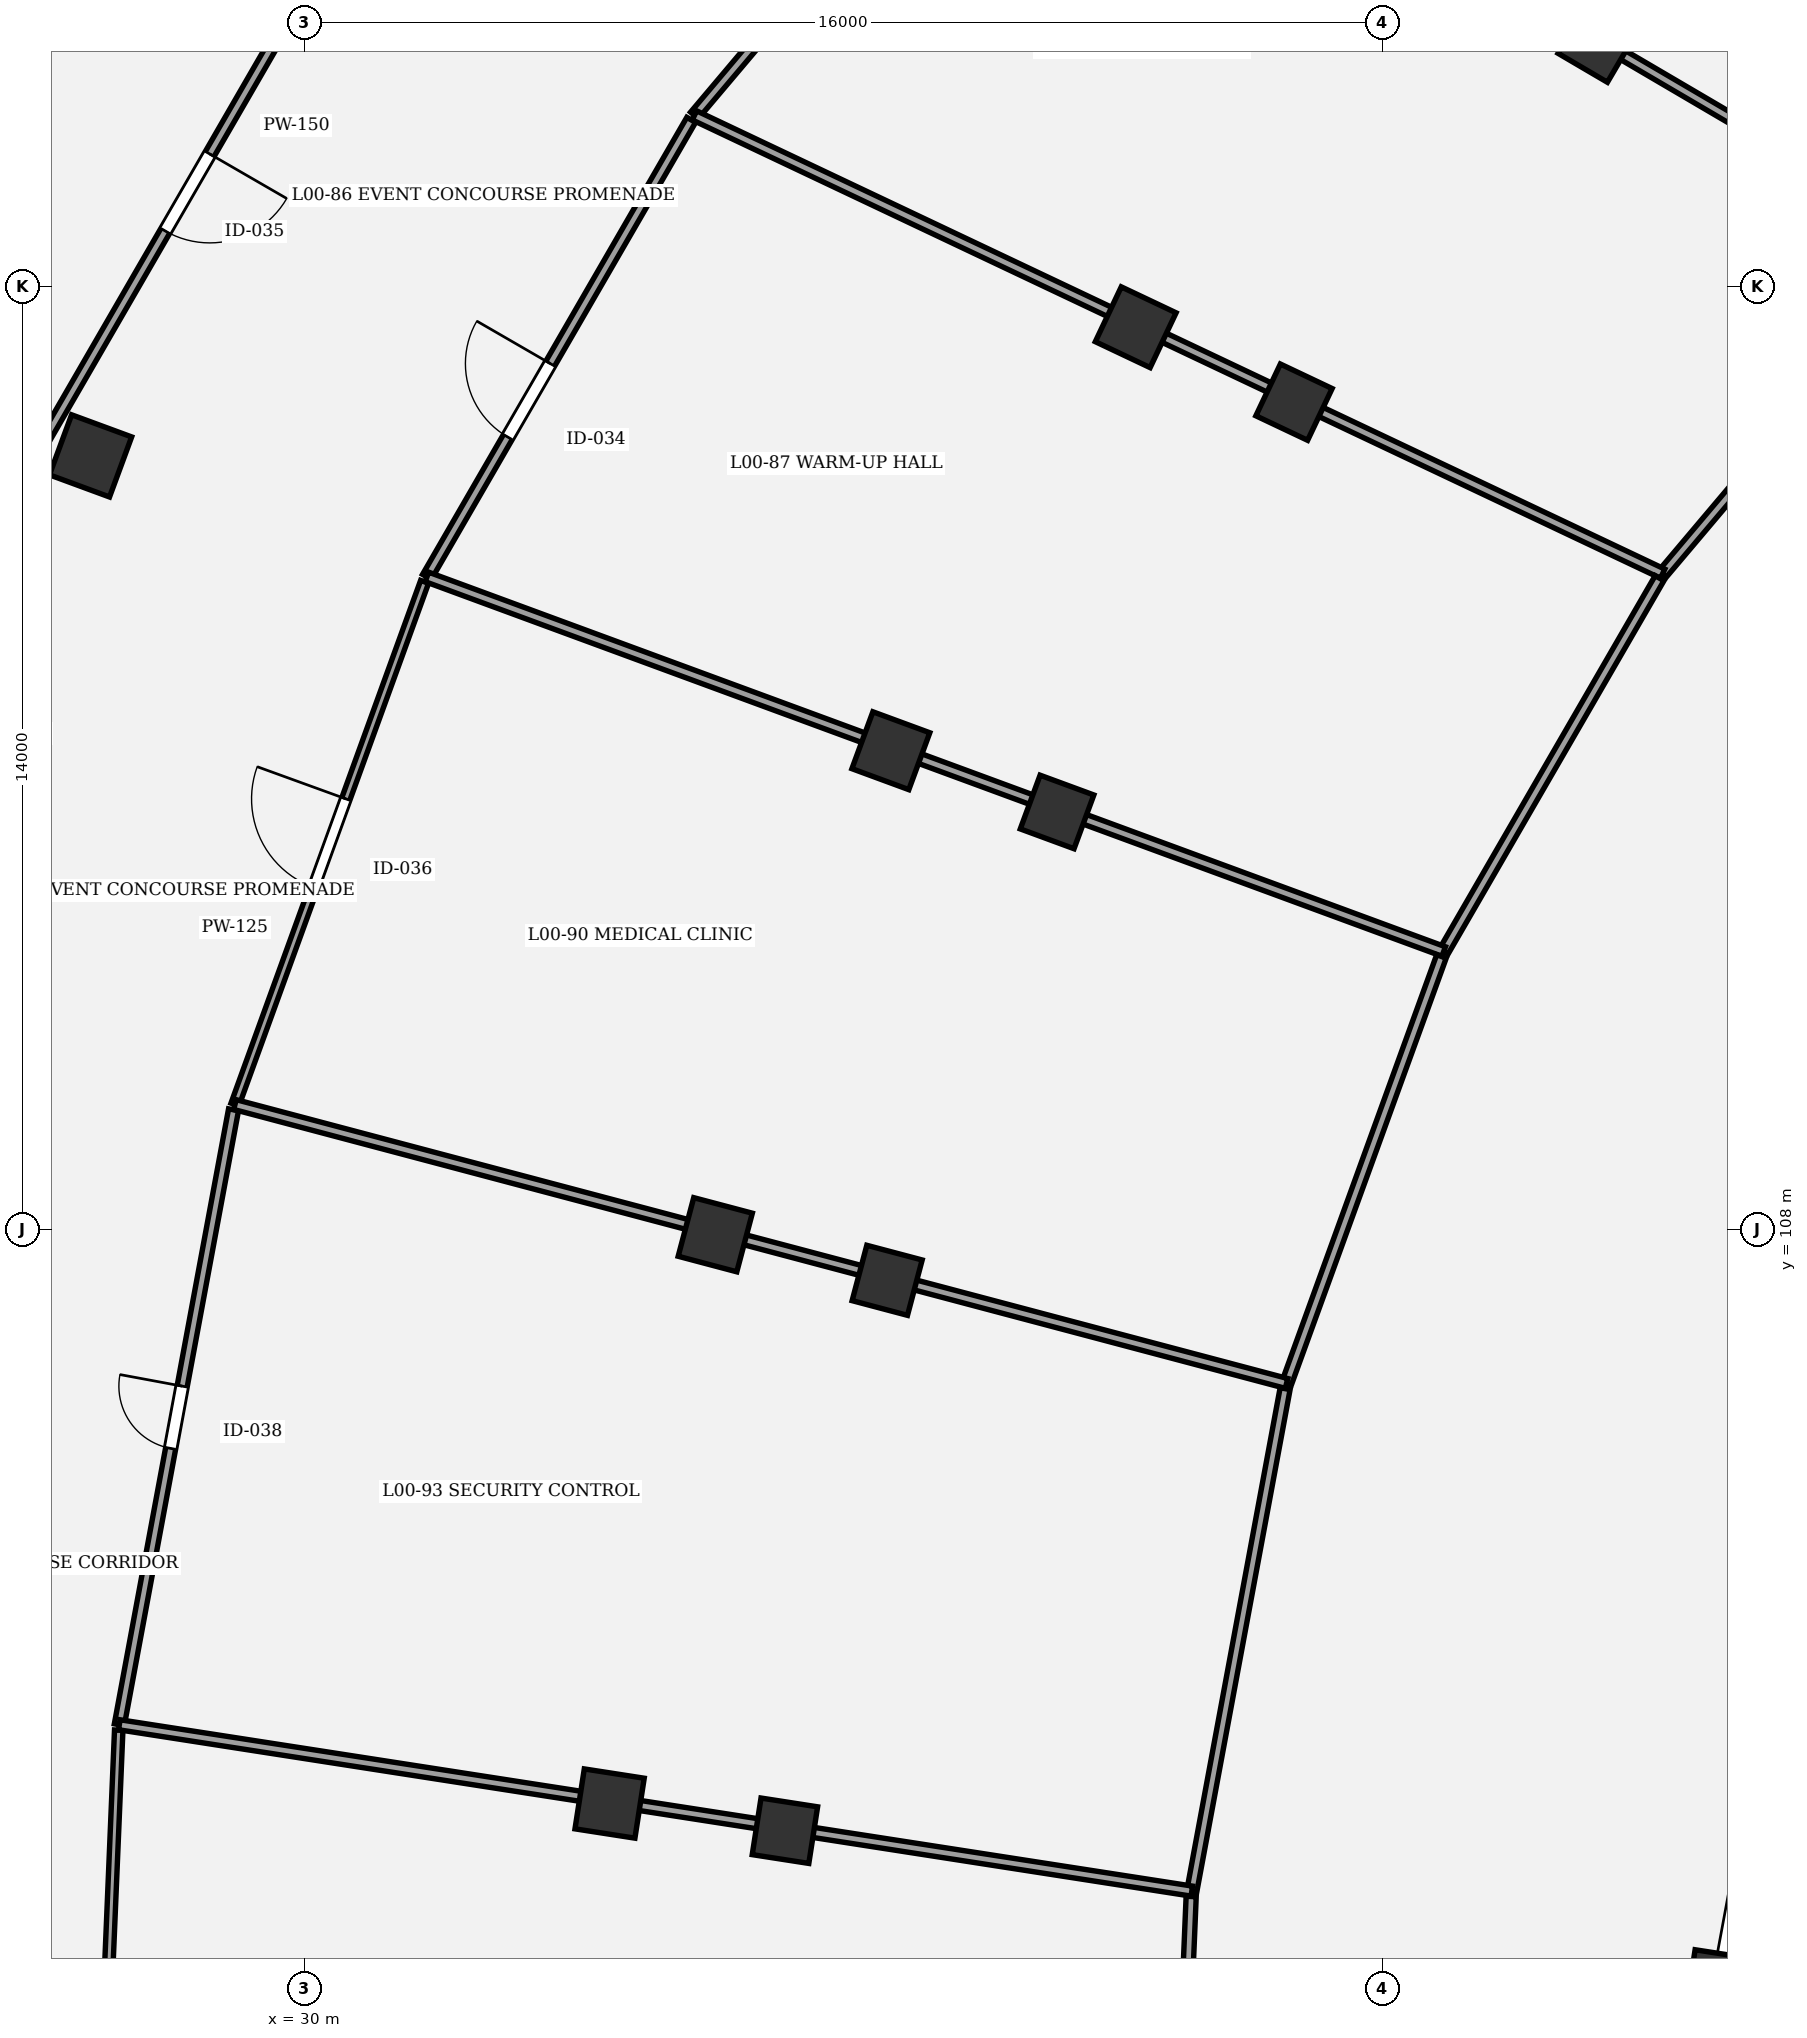
"""IFC4 building model, lengths in metres.
Left out: names, types, materials, properties, quantities, classifications, styles, units other than length and angle.
Written with IfcOpenShell. Run it as: python <this file> out.ifc"""

import sys

from ifc_helpers import new_model, si_unit, direction, frame, frame_2d, origin, origin_2d, place, context, subcontext, project, spatial, rectangle, extrude, element, fill, save


model = new_model("IFC4")
c1 = context("Model", 3, precision=1e-05, world=origin(), true_north=direction((0.0, 1.0)))
c2 = subcontext(c1, "Body", "Model", "MODEL_VIEW")
j1 = project(units=[si_unit("LENGTHUNIT", "METRE"), si_unit("PLANEANGLEUNIT", "RADIAN")], contexts=[c1])
p1 = place(None, origin())
s1 = spatial("IfcSite", under=j1, at=p1, CompositionType="ELEMENT")
p2 = place(p1, origin())
s2 = spatial("IfcBuilding", under=s1, at=p2, CompositionType="ELEMENT")
p3 = place(p2, origin())
s3 = spatial("IfcBuildingStorey", under=s2, at=p3, CompositionType="ELEMENT", Elevation=0.0)
for number, where, z_axis, x_axis in (
    (1, (49.188, 125.611, 0.0), (0.0, 0.0, 1.0), (-0.863, 0.506, 0.0)),
    (2, (44.687, 120.281, 0.0), (0.0, 0.0, 1.0), (-0.904, 0.428, 0.0)),
):
    element("IfcColumn", number, at=place(p3, frame(where, z_axis=z_axis, x_axis=x_axis)), inside=s3, PredefinedType="COLUMN", context=c2, shape_type="SweptSolid", body=[
        extrude(rectangle(XDim=0.85, YDim=0.85, at=origin_2d()), origin(), (0.0, 0.0, 1.0), 5.4),
    ])
p4 = place(p3, frame((42.337, 121.394, 0.0), z_axis=(0.0, 0.0, 1.0), x_axis=(-0.903858661687, 0.4278311813, 0.0)))
e3 = element("IfcColumn", 3, at=p4, inside=s3, PredefinedType="COLUMN", context=c2, shape_type="SweptSolid", body=[
    extrude(rectangle(XDim=0.9, YDim=0.9, at=origin_2d()), origin(), (0.0, 0.0, 1.0), 5.4),
])
p5 = place(p3, frame((41.17, 114.199, 0.0), z_axis=(0.0, 0.0, 1.0), x_axis=(-0.938372433776, 0.34562577382, 0.0)))
e4 = element("IfcColumn", 4, at=p5, inside=s3, PredefinedType="COLUMN", context=c2, shape_type="SweptSolid", body=[
    extrude(rectangle(XDim=0.85, YDim=0.85, at=origin_2d()), origin(), (0.0, 0.0, 1.0), 5.4),
])
p6 = place(p3, frame((38.703, 115.108, 0.0), z_axis=(0.0, 0.0, 1.0), x_axis=(-0.938372433776, 0.34562577382, 0.0)))
e5 = element("IfcColumn", 5, at=p6, inside=s3, PredefinedType="COLUMN", context=c2, shape_type="SweptSolid", body=[
    extrude(rectangle(XDim=0.9, YDim=0.9, at=origin_2d()), origin(), (0.0, 0.0, 1.0), 5.4),
])
p7 = place(p3, frame((26.824, 119.484, 0.0), z_axis=(0.0, 0.0, 1.0), x_axis=(-0.938372433776, 0.34562577382, 0.0)))
e6 = element("IfcColumn", 6, at=p7, inside=s3, PredefinedType="COLUMN", context=c2, shape_type="SweptSolid", body=[
    extrude(rectangle(XDim=0.95, YDim=0.95, at=origin_2d()), origin(), (0.0, 0.0, 1.0), 5.4),
])
p8 = place(p3, frame((38.648, 107.248, 0.0), z_axis=(0.0, 0.0, 1.0), x_axis=(-0.966600102017, 0.256289373133, 0.0)))
e7 = element("IfcColumn", 7, at=p8, inside=s3, PredefinedType="COLUMN", context=c2, shape_type="SweptSolid", body=[
    extrude(rectangle(XDim=0.85, YDim=0.85, at=origin_2d()), origin(), (0.0, 0.0, 1.0), 5.4),
])
p9 = place(p3, frame((36.097, 107.924, 0.0), z_axis=(0.0, 0.0, 1.0), x_axis=(-0.966600102017, 0.256289373133, 0.0)))
e8 = element("IfcColumn", 8, at=p9, inside=s3, PredefinedType="COLUMN", context=c2, shape_type="SweptSolid", body=[
    extrude(rectangle(XDim=0.9, YDim=0.9, at=origin_2d()), origin(), (0.0, 0.0, 1.0), 5.4),
])
p10 = place(p3, frame((50.912, 96.94, 0.0), z_axis=(0.0, 0.0, 1.0), x_axis=(-0.98817491911, 0.153330783737, 0.0)))
e9 = element("IfcColumn", 9, at=p10, inside=s3, PredefinedType="COLUMN", context=c2, shape_type="SweptSolid", body=[
    extrude(rectangle(XDim=0.65, YDim=0.65, at=origin_2d()), origin(), (0.0, 0.0, 1.0), 1.15),
])
p11 = place(p3, frame((37.131, 99.078, 0.0), z_axis=(0.0, 0.0, 1.0), x_axis=(-0.98817491911, 0.153330783737, 0.0)))
e10 = element("IfcColumn", 10, at=p11, inside=s3, PredefinedType="COLUMN", context=c2, shape_type="SweptSolid", body=[
    extrude(rectangle(XDim=0.85, YDim=0.85, at=origin_2d()), origin(), (0.0, 0.0, 1.0), 5.4),
])
p12 = place(p3, frame((34.529, 99.482, 0.0), z_axis=(0.0, 0.0, 1.0), x_axis=(-0.98817491911, 0.153330783737, 0.0)))
e11 = element("IfcColumn", 11, at=p12, inside=s3, PredefinedType="COLUMN", context=c2, shape_type="SweptSolid", body=[
    extrude(rectangle(XDim=0.9, YDim=0.9, at=origin_2d()), origin(), (0.0, 0.0, 1.0), 5.4),
])
p13 = place(p3, frame((35.788, 124.538, 0.0), z_axis=(0.0, 0.0, 1.0), x_axis=(0.645180817826, 0.764029915847, 0.0)))
e12 = element("IfcWall", 12, at=p13, inside=s3, PredefinedType="PARTITIONING", context=c2, shape_type="SweptSolid", body=[
    extrude(rectangle(XDim=7.779, YDim=0.15, at=frame_2d((3.89, 0.0))), origin(), (0.0, 0.0, 1.0), 4.15),
])
p14 = place(p13, frame((2.406, 0.0, 0.0)))
e13 = element("IfcOpeningElement", 13, at=p14, cuts=e12, PredefinedType="OPENING", context=c2, shape_type="SweptSolid", body=[
    extrude(rectangle(XDim=1.18, YDim=2.3, at=frame_2d((0.59, 1.15))), frame((0.0, 0.085, 0.0), z_axis=(0.0, -1.0, 0.0), x_axis=(1.0, 0.0, 0.0)), (0.0, 0.0, 1.0), 0.17),
])
p15 = place(p3, frame((31.817, 117.688, 0.0), z_axis=(0.0, 0.0, 1.0), x_axis=(0.500584301803, 0.865687794063, 0.0)))
e14 = element("IfcWall", 14, at=p15, inside=s3, PredefinedType="PARTITIONING", context=c2, shape_type="SweptSolid", body=[
    extrude(rectangle(XDim=7.837, YDim=0.15, at=frame_2d((3.918, 0.0))), origin(), (0.0, 0.0, 1.0), 4.15),
])
p16 = place(p15, frame((2.398, 0.0, 0.0)))
e15 = element("IfcOpeningElement", 15, at=p16, cuts=e14, PredefinedType="OPENING", context=c2, shape_type="SweptSolid", body=[
    extrude(rectangle(XDim=1.26, YDim=2.3, at=frame_2d((0.63, 1.15))), frame((0.0, 0.085, 0.0), z_axis=(0.0, -1.0, 0.0), x_axis=(1.0, 0.0, 0.0)), (0.0, 0.0, 1.0), 0.17),
])
p17 = place(p3, frame((30.359, 127.019, 0.0), z_axis=(0.0, 0.0, 1.0), x_axis=(-0.500559280672, -0.865702262059, 0.0)))
e16 = element("IfcWall", 16, at=p17, inside=s3, PredefinedType="PARTITIONING", context=c2, shape_type="SweptSolid", body=[
    extrude(rectangle(XDim=8.375, YDim=0.15, at=frame_2d((4.187, 0.0))), origin(), (0.0, 0.0, 1.0), 4.15),
])
p18 = place(p17, frame((3.527, 0.0, 0.0)))
e17 = element("IfcOpeningElement", 17, at=p18, cuts=e16, PredefinedType="OPENING", context=c2, shape_type="SweptSolid", body=[
    extrude(rectangle(XDim=1.32, YDim=2.3, at=frame_2d((0.66, 1.15))), frame((0.0, 0.085, 0.0), z_axis=(0.0, -1.0, 0.0), x_axis=(1.0, 0.0, 0.0)), (0.0, 0.0, 1.0), 0.17),
])
p19 = place(p3, frame((28.968, 109.856, 0.0), z_axis=(0.0, 0.0, 1.0), x_axis=(0.341044733968, 0.940047067669, 0.0)))
e18 = element("IfcWall", 18, at=p19, inside=s3, PredefinedType="PARTITIONING", context=c2, shape_type="SweptSolid", body=[
    extrude(rectangle(XDim=8.254, YDim=0.125, at=frame_2d((4.127, 0.0))), origin(), (0.0, 0.0, 1.0), 4.15),
])
p20 = place(p19, frame((3.427, 0.0, 0.0)))
e19 = element("IfcOpeningElement", 19, at=p20, cuts=e18, PredefinedType="OPENING", context=c2, shape_type="SweptSolid", body=[
    extrude(rectangle(XDim=1.4, YDim=2.3, at=frame_2d((0.7, 1.15))), frame((0.0, 0.073, 0.0), z_axis=(0.0, -1.0, 0.0), x_axis=(1.0, 0.0, 0.0)), (0.0, 0.0, 1.0), 0.145),
])
p21 = place(p3, frame((27.251, 100.651, 0.0), z_axis=(0.0, 0.0, 1.0), x_axis=(0.182600545941, 0.983187184936, 0.0)))
e20 = element("IfcWall", 20, at=p21, inside=s3, PredefinedType="PARTITIONING", context=c2, shape_type="SweptSolid", body=[
    extrude(rectangle(XDim=9.284, YDim=0.15, at=frame_2d((4.642, 0.0))), origin(), (0.0, 0.0, 1.0), 4.15),
])
p22 = place(p21, frame((4.172, 0.0, 0.0)))
e21 = element("IfcOpeningElement", 21, at=p22, cuts=e20, PredefinedType="OPENING", context=c2, shape_type="SweptSolid", body=[
    extrude(rectangle(XDim=0.94, YDim=2.1, at=frame_2d((0.47, 1.05))), frame((0.0, 0.085, 0.0), z_axis=(0.0, -1.0, 0.0), x_axis=(1.0, 0.0, 0.0)), (0.0, 0.0, 1.0), 0.17),
])
p23 = place(p3, frame((26.675, 87.04, 0.0), z_axis=(0.0, 0.0, 1.0), x_axis=(0.041894479342, 0.999122040894, 0.0)))
e22 = element("IfcWall", 22, at=p23, inside=s3, PredefinedType="PARTITIONING", context=c2, shape_type="SweptSolid", body=[
    extrude(rectangle(XDim=13.543, YDim=0.125, at=frame_2d((6.771, 0.0))), origin(), (0.0, 0.0, 1.0), 4.15),
])
p24 = place(p23, frame((6.281, 0.0, 0.0)))
e23 = element("IfcOpeningElement", 23, at=p24, cuts=e22, PredefinedType="OPENING", context=c2, shape_type="SweptSolid", body=[
    extrude(rectangle(XDim=0.98, YDim=2.1, at=frame_2d((0.49, 1.05))), frame((0.0, 0.073, 0.0), z_axis=(0.0, -1.0, 0.0), x_axis=(1.0, 0.0, 0.0)), (0.0, 0.0, 1.0), 0.145),
])
p25 = place(p3, frame((54.315, 122.65, 0.0), z_axis=(0.0, 0.0, 1.0), x_axis=(-0.862516522271, 0.50602890116, 0.0)))
e24 = element("IfcWall", 24, at=p25, inside=s3, PredefinedType="PARTITIONING", context=c2, shape_type="SweptSolid", body=[
    extrude(rectangle(XDim=15.591, YDim=0.15, at=frame_2d((7.796, 0.0))), origin(), (0.0, 0.0, 1.0), 4.15),
])
p26 = place(p3, frame((54.258, 122.59, 0.0), z_axis=(0.0, 0.0, 1.0), x_axis=(-0.645182313149, -0.764028653127, 0.0)))
e25 = element("IfcWall", 25, at=p26, inside=s3, PredefinedType="PARTITIONING", context=c2, shape_type="SweptSolid", body=[
    extrude(rectangle(XDim=6.354, YDim=0.15, at=frame_2d((3.177, 0.0))), origin(), (0.0, 0.0, 1.0), 4.15),
])
p27 = place(p3, frame((50.158, 117.736, 0.0), z_axis=(0.0, 0.0, 1.0), x_axis=(-0.903856618289, 0.427835498263, 0.0)))
e26 = element("IfcWall", 26, at=p27, inside=s3, PredefinedType="PARTITIONING", context=c2, shape_type="SweptSolid", body=[
    extrude(rectangle(XDim=15.899, YDim=0.15, at=frame_2d((7.95, 0.0))), origin(), (0.0, 0.0, 1.0), 4.15),
])
p28 = place(p3, frame((50.113, 117.669, 0.0), z_axis=(0.0, 0.0, 1.0), x_axis=(-0.500568608351, -0.865696868617, 0.0)))
e27 = element("IfcWall", 27, at=p28, inside=s3, PredefinedType="PARTITIONING", context=c2, shape_type="SweptSolid", body=[
    extrude(rectangle(XDim=6.401, YDim=0.15, at=frame_2d((3.2, 0.0))), origin(), (0.0, 0.0, 1.0), 4.15),
])
p29 = place(p3, frame((46.909, 112.128, 0.0), z_axis=(0.0, 0.0, 1.0), x_axis=(-0.938344671795, 0.345701138143, 0.0)))
e28 = element("IfcWall", 28, at=p29, inside=s3, PredefinedType="PARTITIONING", context=c2, shape_type="SweptSolid", body=[
    extrude(rectangle(XDim=16.083, YDim=0.15, at=frame_2d((8.042, 0.0))), origin(), (0.0, 0.0, 1.0), 4.15),
])
p30 = place(p3, frame((46.875, 112.055, 0.0), z_axis=(0.0, 0.0, 1.0), x_axis=(-0.341039355212, -0.940049019039, 0.0)))
e29 = element("IfcWall", 29, at=p30, inside=s3, PredefinedType="PARTITIONING", context=c2, shape_type="SweptSolid", body=[
    extrude(rectangle(XDim=6.742, YDim=0.15, at=frame_2d((3.371, 0.0))), origin(), (0.0, 0.0, 1.0), 4.15),
])
p31 = place(p3, frame((44.576, 105.717, 0.0), z_axis=(0.0, 0.0, 1.0), x_axis=(-0.966587096108, 0.256338420135, 0.0)))
e30 = element("IfcWall", 30, at=p31, inside=s3, PredefinedType="PARTITIONING", context=c2, shape_type="SweptSolid", body=[
    extrude(rectangle(XDim=16.148, YDim=0.15, at=frame_2d((8.074, 0.0))), origin(), (0.0, 0.0, 1.0), 4.15),
])
p32 = place(p3, frame((44.555, 105.64, 0.0), z_axis=(0.0, 0.0, 1.0), x_axis=(-0.182622862121, -0.983183040044, 0.0)))
e31 = element("IfcWall", 31, at=p32, inside=s3, PredefinedType="PARTITIONING", context=c2, shape_type="SweptSolid", body=[
    extrude(rectangle(XDim=7.585, YDim=0.15, at=frame_2d((3.792, 0.0))), origin(), (0.0, 0.0, 1.0), 4.15),
])
p33 = place(p3, frame((43.17, 98.182, 0.0), z_axis=(0.0, 0.0, 1.0), x_axis=(-0.988184709928, 0.153267671296, 0.0)))
e32 = element("IfcWall", 32, at=p33, inside=s3, PredefinedType="PARTITIONING", context=c2, shape_type="SweptSolid", body=[
    extrude(rectangle(XDim=16.109, YDim=0.15, at=frame_2d((8.055, 0.0))), origin(), (0.0, 0.0, 1.0), 4.15),
])
p34 = place(p3, frame((43.161, 98.102, 0.0), z_axis=(0.0, 0.0, 1.0), x_axis=(-0.041917617243, -0.999121070424, 0.0)))
e33 = element("IfcWall", 33, at=p34, inside=s3, PredefinedType="PARTITIONING", context=c2, shape_type="SweptSolid", body=[
    extrude(rectangle(XDim=11.072, YDim=0.15, at=frame_2d((5.536, 0.0))), origin(), (0.0, 0.0, 1.0), 4.15),
])
p35 = place(p16, origin())
e34 = element("IfcDoor", 34, at=p35, inside=s3, OperationType="SINGLE_SWING_RIGHT", PredefinedType="DOOR", context=c2, shape_type="SweptSolid", body=[
    extrude(rectangle(XDim=1.26, YDim=2.3, at=frame_2d((0.63, 1.15))), frame((0.0, 0.025, 0.0), z_axis=(0.0, -1.0, 0.0), x_axis=(1.0, 0.0, 0.0)), (0.0, 0.0, 1.0), 0.05),
])
fill(e15, e34)
p36 = place(p18, origin())
e35 = element("IfcDoor", 35, at=p36, inside=s3, OperationType="SINGLE_SWING_LEFT", PredefinedType="DOOR", context=c2, shape_type="SweptSolid", body=[
    extrude(rectangle(XDim=1.32, YDim=2.3, at=frame_2d((0.66, 1.15))), frame((0.0, 0.025, 0.0), z_axis=(0.0, -1.0, 0.0), x_axis=(1.0, 0.0, 0.0)), (0.0, 0.0, 1.0), 0.05),
])
fill(e17, e35)
p37 = place(p20, origin())
e36 = element("IfcDoor", 36, at=p37, inside=s3, OperationType="SINGLE_SWING_RIGHT", PredefinedType="DOOR", context=c2, shape_type="SweptSolid", body=[
    extrude(rectangle(XDim=1.4, YDim=2.3, at=frame_2d((0.7, 1.15))), frame((0.0, 0.025, 0.0), z_axis=(0.0, -1.0, 0.0), x_axis=(1.0, 0.0, 0.0)), (0.0, 0.0, 1.0), 0.05),
])
fill(e19, e36)
p38 = place(p22, origin())
e37 = element("IfcDoor", 37, at=p38, inside=s3, OperationType="SINGLE_SWING_RIGHT", PredefinedType="DOOR", context=c2, shape_type="SweptSolid", body=[
    extrude(rectangle(XDim=0.94, YDim=2.1, at=frame_2d((0.47, 1.05))), frame((0.0, 0.025, 0.0), z_axis=(0.0, -1.0, 0.0), x_axis=(1.0, 0.0, 0.0)), (0.0, 0.0, 1.0), 0.05),
])
fill(e21, e37)
save(model, sys.argv[1])
